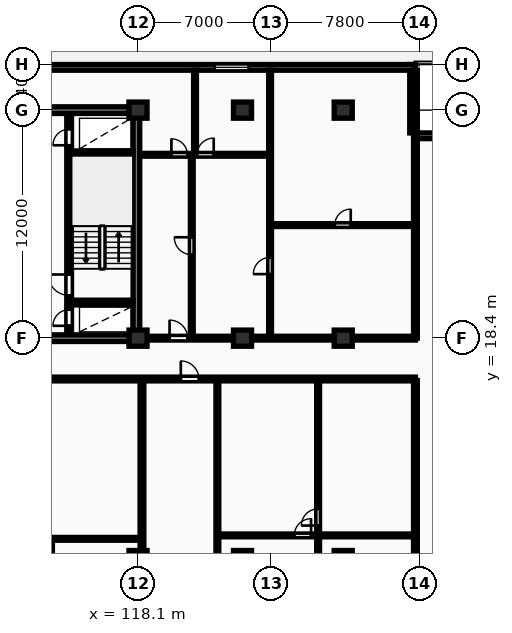
"""IFC4 building model, lengths in metres.
Left out: names, types, materials, properties, quantities, classifications, styles, units other than length and angle.
Written with IfcOpenShell. Run it as: python <this file> out.ifc"""

import sys

from ifc_helpers import new_model, si_unit, direction, frame, frame_2d, origin, origin_2d, place, context, subcontext, project, spatial, rectangle, extrude, element, fill, save


model = new_model("IFC4")
c1 = context("Model", 3, precision=1e-05, world=origin(), true_north=direction((0.0, 1.0)))
c2 = subcontext(c1, "Body", "Model", "MODEL_VIEW")
j1 = project(units=[si_unit("LENGTHUNIT", "METRE"), si_unit("PLANEANGLEUNIT", "RADIAN")], contexts=[c1])
p1 = place(None, origin())
s1 = spatial("IfcSite", under=j1, at=p1, CompositionType="ELEMENT")
p2 = place(p1, origin())
s2 = spatial("IfcBuilding", under=s1, at=p2, CompositionType="ELEMENT")
p3 = place(p2, frame((0.0, 0.0, 24.0)))
s3 = spatial("IfcBuildingStorey", under=s2, at=p3, CompositionType="ELEMENT", Elevation=24.0)
for number, where, z_axis, x_axis in (
    (1, (118.1, 6.8, 0.0), (0.0, 0.0, 1.0), (1.0, 0.0, 0.0)),
    (2, (118.1, 18.4, 0.0), (0.0, 0.0, 1.0), (1.0, 0.0, 0.0)),
    (3, (118.1, 30.4, 0.0), (0.0, 0.0, 1.0), (1.0, 0.0, 0.0)),
    (4, (123.6, 6.8, 0.0), (0.0, 0.0, 1.0), (1.0, 0.0, 0.0)),
    (5, (123.6, 18.4, 0.0), (0.0, 0.0, 1.0), (1.0, 0.0, 0.0)),
    (6, (123.6, 30.4, 0.0), (0.0, 0.0, 1.0), (1.0, 0.0, 0.0)),
    (7, (128.9, 6.8, 0.0), (0.0, 0.0, 1.0), (1.0, 0.0, 0.0)),
    (8, (128.9, 18.4, 0.0), (0.0, 0.0, 1.0), (1.0, 0.0, 0.0)),
    (9, (128.9, 30.4, 0.0), (0.0, 0.0, 1.0), (1.0, 0.0, 0.0)),
):
    element("IfcColumn", number, at=place(p3, frame(where, z_axis=z_axis, x_axis=x_axis)), inside=s3, PredefinedType="COLUMN", context=c2, shape_type="SweptSolid", body=[
        extrude(rectangle(XDim=0.95, YDim=0.85, at=origin_2d()), origin(), (0.0, 0.0, 1.0), 3.25),
    ])
for number, where, z_axis, x_axis in (
    (10, (136.3, 29.05, 0.0), (0.0, 0.0, 1.0), (-1.0, 0.0, 0.0)),
    (11, (132.55, 29.2, 0.0), (0.0, 0.0, 1.0), (0.0, 1.0, 0.0)),
):
    element("IfcWall", number, at=place(p3, frame(where, z_axis=z_axis, x_axis=x_axis)), inside=s3, PredefinedType="STANDARD", context=c2, shape_type="SweptSolid", body=[
        extrude(rectangle(XDim=3.6, YDim=0.3, at=frame_2d((1.8, 0.0))), origin(), (0.0, 0.0, 1.0), 2.97),
    ])
p4 = place(p3, frame((132.7, 32.65, 0.0), z_axis=(0.0, 0.0, 1.0), x_axis=(-1.0, 0.0, 0.0)))
e12 = element("IfcWall", 12, at=p4, inside=s3, PredefinedType="STANDARD", context=c2, shape_type="SweptSolid", body=[
    extrude(rectangle(XDim=62.0, YDim=0.3, at=frame_2d((31.0, 0.0))), origin(), (0.0, 0.0, 1.0), 2.97),
])
p5 = place(p4, frame((52.125, 0.0, 0.85)))
e13 = element("IfcOpeningElement", 13, at=p5, cuts=e12, PredefinedType="OPENING", context=c2, shape_type="SweptSolid", body=[
    extrude(rectangle(XDim=1.8, YDim=1.8, at=frame_2d((0.9, 0.9))), frame((0.0, 0.16, 0.0), z_axis=(0.0, -1.0, 0.0), x_axis=(1.0, 0.0, 0.0)), (0.0, 0.0, 1.0), 0.32),
])
p6 = place(p4, frame((8.775, 0.0, 0.85)))
e14 = element("IfcOpeningElement", 14, at=p6, cuts=e12, PredefinedType="OPENING", context=c2, shape_type="SweptSolid", body=[
    extrude(rectangle(XDim=1.8, YDim=1.8, at=frame_2d((0.9, 0.9))), frame((0.0, 0.16, 0.0), z_axis=(0.0, -1.0, 0.0), x_axis=(1.0, 0.0, 0.0)), (0.0, 0.0, 1.0), 0.32),
])
p7 = place(p3, frame((81.925, 30.4, 0.0), z_axis=(0.0, 0.0, 1.0), x_axis=(1.0, 0.0, 0.0)))
e15 = element("IfcWall", 15, at=p7, inside=s3, PredefinedType="SHEAR", context=c2, shape_type="SweptSolid", body=[
    extrude(rectangle(XDim=36.265, YDim=0.35, at=frame_2d((18.132, 0.0))), origin(), (0.0, 0.0, 1.0), 3.25),
])
p8 = place(p3, frame((118.015, 18.575, 0.0), z_axis=(0.0, 0.0, 1.0), x_axis=(0.0, 1.0, 0.0)))
e16 = element("IfcWall", 16, at=p8, inside=s3, PredefinedType="SHEAR", context=c2, shape_type="SweptSolid", body=[
    extrude(rectangle(XDim=11.65, YDim=0.35, at=frame_2d((5.825, 0.0))), origin(), (0.0, 0.0, 1.0), 3.25),
])
p9 = place(p3, frame((81.925, 18.4, 0.0), z_axis=(0.0, 0.0, 1.0), x_axis=(1.0, 0.0, 0.0)))
e17 = element("IfcWall", 17, at=p9, inside=s3, PredefinedType="SHEAR", context=c2, shape_type="SweptSolid", body=[
    extrude(rectangle(XDim=36.265, YDim=0.35, at=frame_2d((18.132, 0.0))), origin(), (0.0, 0.0, 1.0), 3.25),
])
p10 = place(p9, frame((5.675, 0.0, 0.0)))
e18 = element("IfcOpeningElement", 18, at=p10, cuts=e17, PredefinedType="OPENING", context=c2, shape_type="SweptSolid", body=[
    extrude(rectangle(XDim=1.0, YDim=2.15, at=frame_2d((0.5, 1.075))), frame((0.0, 0.185, 0.0), z_axis=(0.0, -1.0, 0.0), x_axis=(1.0, 0.0, 0.0)), (0.0, 0.0, 1.0), 0.37),
])
p11 = place(p9, frame((21.925, 0.0, 0.0)))
e19 = element("IfcOpeningElement", 19, at=p11, cuts=e17, PredefinedType="OPENING", context=c2, shape_type="SweptSolid", body=[
    extrude(rectangle(XDim=1.5, YDim=2.2, at=frame_2d((0.75, 1.1))), frame((0.0, 0.185, 0.0), z_axis=(0.0, -1.0, 0.0), x_axis=(1.0, 0.0, 0.0)), (0.0, 0.0, 1.0), 0.37),
])
p12 = place(p9, frame((29.875, 0.0, 0.0)))
e20 = element("IfcOpeningElement", 20, at=p12, cuts=e17, PredefinedType="OPENING", context=c2, shape_type="SweptSolid", body=[
    extrude(rectangle(XDim=1.0, YDim=2.15, at=frame_2d((0.5, 1.075))), frame((0.0, 0.185, 0.0), z_axis=(0.0, -1.0, 0.0), x_axis=(1.0, 0.0, 0.0)), (0.0, 0.0, 1.0), 0.37),
])
p13 = place(p3, frame((114.475, 18.6, 0.0), z_axis=(0.0, 0.0, 1.0), x_axis=(0.0, 1.0, 0.0)))
e21 = element("IfcWall", 21, at=p13, inside=s3, PredefinedType="SHEAR", context=c2, shape_type="SweptSolid", body=[
    extrude(rectangle(XDim=11.6, YDim=0.25, at=frame_2d((5.8, 0.0))), origin(), (0.0, 0.0, 1.0), 3.25),
])
p14 = place(p13, frame((0.45, 0.0, 0.0)))
e22 = element("IfcOpeningElement", 22, at=p14, cuts=e21, PredefinedType="OPENING", context=c2, shape_type="SweptSolid", body=[
    extrude(rectangle(XDim=0.85, YDim=2.05, at=frame_2d((0.425, 1.025))), frame((0.0, 0.135, 0.0), z_axis=(0.0, -1.0, 0.0), x_axis=(1.0, 0.0, 0.0)), (0.0, 0.0, 1.0), 0.27),
])
p15 = place(p13, frame((2.05, 0.0, 0.0)))
e23 = element("IfcOpeningElement", 23, at=p15, cuts=e21, PredefinedType="OPENING", context=c2, shape_type="SweptSolid", body=[
    extrude(rectangle(XDim=1.1, YDim=2.1, at=frame_2d((0.55, 1.05))), frame((0.0, 0.135, 0.0), z_axis=(0.0, -1.0, 0.0), x_axis=(1.0, 0.0, 0.0)), (0.0, 0.0, 1.0), 0.27),
])
p16 = place(p13, frame((9.95, 0.0, 0.0)))
e24 = element("IfcOpeningElement", 24, at=p16, cuts=e21, PredefinedType="OPENING", context=c2, shape_type="SweptSolid", body=[
    extrude(rectangle(XDim=0.85, YDim=2.05, at=frame_2d((0.425, 1.025))), frame((0.0, 0.135, 0.0), z_axis=(0.0, -1.0, 0.0), x_axis=(1.0, 0.0, 0.0)), (0.0, 0.0, 1.0), 0.27),
])
for number, where, z_axis, x_axis in (
    (25, (114.6, 20.275, 0.0), (0.0, 0.0, 1.0), (1.0, 0.0, 0.0)),
    (26, (114.6, 28.125, 0.0), (0.0, 0.0, 1.0), (1.0, 0.0, 0.0)),
):
    element("IfcWall", number, at=place(p3, frame(where, z_axis=z_axis, x_axis=x_axis)), inside=s3, PredefinedType="SHEAR", context=c2, shape_type="SweptSolid", body=[
        extrude(rectangle(XDim=3.24, YDim=0.25, at=frame_2d((1.62, 0.0))), origin(), (0.0, 0.0, 1.0), 3.25),
    ])
p17 = place(p3, frame((132.7, 18.4, 0.0), z_axis=(0.0, 0.0, 1.0), x_axis=(0.0, 1.0, 0.0)))
e27 = element("IfcWall", 27, at=p17, inside=s3, PredefinedType="PARTITIONING", context=c2, shape_type="SweptSolid", body=[
    extrude(rectangle(XDim=14.1, YDim=0.2, at=frame_2d((7.05, 0.0))), origin(), (0.0, 0.0, 1.0), 2.97),
])
p18 = place(p3, frame((125.05, 24.35, 0.0), z_axis=(0.0, 0.0, 1.0), x_axis=(1.0, 0.0, 0.0)))
e28 = element("IfcWall", 28, at=p18, inside=s3, PredefinedType="PARTITIONING", context=c2, shape_type="SweptSolid", body=[
    extrude(rectangle(XDim=7.65, YDim=0.15, at=frame_2d((3.825, 0.0))), origin(), (0.0, 0.0, 1.0), 2.97),
])
p19 = place(p18, frame((3.405, 0.0, 0.0)))
e29 = element("IfcOpeningElement", 29, at=p19, cuts=e28, PredefinedType="OPENING", context=c2, shape_type="SweptSolid", body=[
    extrude(rectangle(XDim=0.84, YDim=2.04, at=frame_2d((0.42, 1.02))), frame((0.0, 0.085, 0.0), z_axis=(0.0, -1.0, 0.0), x_axis=(1.0, 0.0, 0.0)), (0.0, 0.0, 1.0), 0.17),
])
p20 = place(p3, frame((125.05, 18.45, 0.0), z_axis=(0.0, 0.0, 1.0), x_axis=(0.0, 1.0, 0.0)))
e30 = element("IfcWall", 30, at=p20, inside=s3, PredefinedType="PARTITIONING", context=c2, shape_type="SweptSolid", body=[
    extrude(rectangle(XDim=14.05, YDim=0.15, at=frame_2d((7.025, 0.0))), origin(), (0.0, 0.0, 1.0), 2.97),
])
p21 = place(p20, frame((3.32, 0.0, 0.0)))
e31 = element("IfcOpeningElement", 31, at=p21, cuts=e30, PredefinedType="OPENING", context=c2, shape_type="SweptSolid", body=[
    extrude(rectangle(XDim=0.88, YDim=2.06, at=frame_2d((0.44, 1.03))), frame((0.0, 0.085, 0.0), z_axis=(0.0, -1.0, 0.0), x_axis=(1.0, 0.0, 0.0)), (0.0, 0.0, 1.0), 0.17),
])
p22 = place(p3, frame((120.93, 18.45, 0.0), z_axis=(0.0, 0.0, 1.0), x_axis=(0.0, 1.0, 0.0)))
e32 = element("IfcWall", 32, at=p22, inside=s3, PredefinedType="PARTITIONING", context=c2, shape_type="SweptSolid", body=[
    extrude(rectangle(XDim=9.6, YDim=0.15, at=frame_2d((4.8, 0.0))), origin(), (0.0, 0.0, 1.0), 2.97),
])
p23 = place(p22, frame((4.34, 0.0, 0.0)))
e33 = element("IfcOpeningElement", 33, at=p23, cuts=e32, PredefinedType="OPENING", context=c2, shape_type="SweptSolid", body=[
    extrude(rectangle(XDim=0.92, YDim=2.08, at=frame_2d((0.46, 1.04))), frame((0.0, 0.085, 0.0), z_axis=(0.0, -1.0, 0.0), x_axis=(1.0, 0.0, 0.0)), (0.0, 0.0, 1.0), 0.17),
])
p24 = place(p3, frame((121.1, 28.05, 0.0), z_axis=(0.0, 0.0, 1.0), x_axis=(0.0, 1.0, 0.0)))
e34 = element("IfcWall", 34, at=p24, inside=s3, PredefinedType="PARTITIONING", context=c2, shape_type="SweptSolid", body=[
    extrude(rectangle(XDim=4.45, YDim=0.15, at=frame_2d((2.225, 0.0))), origin(), (0.0, 0.0, 1.0), 2.97),
])
p25 = place(p3, frame((118.27, 28.05, 0.0), z_axis=(0.0, 0.0, 1.0), x_axis=(1.0, 0.0, 0.0)))
e35 = element("IfcWall", 35, at=p25, inside=s3, PredefinedType="PARTITIONING", context=c2, shape_type="SweptSolid", body=[
    extrude(rectangle(XDim=6.76, YDim=0.15, at=frame_2d((3.38, 0.0))), origin(), (0.0, 0.0, 1.0), 2.97),
])
p26 = place(p25, frame((1.587, 0.0, 0.0)))
e36 = element("IfcOpeningElement", 36, at=p26, cuts=e35, PredefinedType="OPENING", context=c2, shape_type="SweptSolid", body=[
    extrude(rectangle(XDim=0.84, YDim=2.04, at=frame_2d((0.42, 1.02))), frame((0.0, 0.085, 0.0), z_axis=(0.0, -1.0, 0.0), x_axis=(1.0, 0.0, 0.0)), (0.0, 0.0, 1.0), 0.17),
])
p27 = place(p25, frame((2.934, 0.0, 0.0)))
e37 = element("IfcOpeningElement", 37, at=p27, cuts=e35, PredefinedType="OPENING", context=c2, shape_type="SweptSolid", body=[
    extrude(rectangle(XDim=0.88, YDim=2.06, at=frame_2d((0.44, 1.03))), frame((0.0, 0.085, 0.0), z_axis=(0.0, -1.0, 0.0), x_axis=(1.0, 0.0, 0.0)), (0.0, 0.0, 1.0), 0.17),
])
p28 = place(p3, frame((118.25, 18.4, 0.0), z_axis=(0.0, 0.0, 1.0), x_axis=(1.0, 0.0, 0.0)))
e38 = element("IfcWall", 38, at=p28, inside=s3, PredefinedType="PARTITIONING", context=c2, shape_type="SweptSolid", body=[
    extrude(rectangle(XDim=14.45, YDim=0.2, at=frame_2d((7.225, 0.0))), origin(), (0.0, 0.0, 1.0), 2.37),
])
p29 = place(p28, frame((1.51, 0.0, 0.0)))
e39 = element("IfcOpeningElement", 39, at=p29, cuts=e38, PredefinedType="OPENING", context=c2, shape_type="SweptSolid", body=[
    extrude(rectangle(XDim=0.95, YDim=2.15, at=frame_2d((0.475, 1.075))), frame((0.0, 0.11, 0.0), z_axis=(0.0, -1.0, 0.0), x_axis=(1.0, 0.0, 0.0)), (0.0, 0.0, 1.0), 0.22),
])
p30 = place(p3, frame((132.7, -10.9, 0.0), z_axis=(0.0, 0.0, 1.0), x_axis=(0.0, 1.0, 0.0)))
e40 = element("IfcWall", 40, at=p30, inside=s3, PredefinedType="PARTITIONING", context=c2, shape_type="SweptSolid", body=[
    extrude(rectangle(XDim=27.07, YDim=0.2, at=frame_2d((13.535, 0.0))), origin(), (0.0, 0.0, 1.0), 2.97),
])
p31 = place(p3, frame((118.307, -10.9, 0.0), z_axis=(0.0, 0.0, 1.0), x_axis=(0.0, 1.0, 0.0)))
e41 = element("IfcWall", 41, at=p31, inside=s3, PredefinedType="PARTITIONING", context=c2, shape_type="SweptSolid", body=[
    extrude(rectangle(XDim=27.07, YDim=0.2, at=frame_2d((13.535, 0.0))), origin(), (0.0, 0.0, 1.0), 2.22),
])
p32 = place(p3, frame((109.052, 7.84, 0.0), z_axis=(0.0, 0.0, 1.0), x_axis=(1.0, 0.0, 0.0)))
e42 = element("IfcWall", 42, at=p32, inside=s3, PredefinedType="PARTITIONING", context=c2, shape_type="SweptSolid", body=[
    extrude(rectangle(XDim=9.176, YDim=0.15, at=frame_2d((4.588, 0.0))), origin(), (0.0, 0.0, 1.0), 2.97),
])
p33 = place(p32, frame((3.307, 0.0, 0.0)))
e43 = element("IfcOpeningElement", 43, at=p33, cuts=e42, PredefinedType="OPENING", context=c2, shape_type="SweptSolid", body=[
    extrude(rectangle(XDim=0.88, YDim=2.06, at=frame_2d((0.44, 1.03))), frame((0.0, 0.085, 0.0), z_axis=(0.0, -1.0, 0.0), x_axis=(1.0, 0.0, 0.0)), (0.0, 0.0, 1.0), 0.17),
])
p34 = place(p3, frame((127.579, -0.51, 0.0), z_axis=(0.0, 0.0, 1.0), x_axis=(0.0, 1.0, 0.0)))
e44 = element("IfcWall", 44, at=p34, inside=s3, PredefinedType="PARTITIONING", context=c2, shape_type="SweptSolid", body=[
    extrude(rectangle(XDim=16.7, YDim=0.15, at=frame_2d((8.35, 0.0))), origin(), (0.0, 0.0, 1.0), 2.97),
])
p35 = place(p34, frame((4.746, 0.0, 0.0)))
e45 = element("IfcOpeningElement", 45, at=p35, cuts=e44, PredefinedType="OPENING", context=c2, shape_type="SweptSolid", body=[
    extrude(rectangle(XDim=0.84, YDim=2.04, at=frame_2d((0.42, 1.02))), frame((0.0, 0.085, 0.0), z_axis=(0.0, -1.0, 0.0), x_axis=(1.0, 0.0, 0.0)), (0.0, 0.0, 1.0), 0.17),
])
p36 = place(p34, frame((9.048, 0.0, 0.0)))
e46 = element("IfcOpeningElement", 46, at=p36, cuts=e44, PredefinedType="OPENING", context=c2, shape_type="SweptSolid", body=[
    extrude(rectangle(XDim=0.88, YDim=2.06, at=frame_2d((0.44, 1.03))), frame((0.0, 0.085, 0.0), z_axis=(0.0, -1.0, 0.0), x_axis=(1.0, 0.0, 0.0)), (0.0, 0.0, 1.0), 0.17),
])
p37 = place(p3, frame((122.337, 8.02, 0.0), z_axis=(0.0, 0.0, 1.0), x_axis=(1.0, 0.0, 0.0)))
e47 = element("IfcWall", 47, at=p37, inside=s3, PredefinedType="PARTITIONING", context=c2, shape_type="SweptSolid", body=[
    extrude(rectangle(XDim=10.283, YDim=0.15, at=frame_2d((5.142, 0.0))), origin(), (0.0, 0.0, 1.0), 2.97),
])
p38 = place(p37, frame((3.99, 0.0, 0.0)))
e48 = element("IfcOpeningElement", 48, at=p38, cuts=e47, PredefinedType="OPENING", context=c2, shape_type="SweptSolid", body=[
    extrude(rectangle(XDim=0.88, YDim=2.06, at=frame_2d((0.44, 1.03))), frame((0.0, 0.085, 0.0), z_axis=(0.0, -1.0, 0.0), x_axis=(1.0, 0.0, 0.0)), (0.0, 0.0, 1.0), 0.17),
])
p39 = place(p3, frame((122.277, -0.51, 0.0), z_axis=(0.0, 0.0, 1.0), x_axis=(0.0, 1.0, 0.0)))
e49 = element("IfcWall", 49, at=p39, inside=s3, PredefinedType="PARTITIONING", context=c2, shape_type="SweptSolid", body=[
    extrude(rectangle(XDim=16.7, YDim=0.15, at=frame_2d((8.35, 0.0))), origin(), (0.0, 0.0, 1.0), 2.97),
])
p40 = place(p39, frame((4.721, 0.0, 0.0)))
e50 = element("IfcOpeningElement", 50, at=p40, cuts=e49, PredefinedType="OPENING", context=c2, shape_type="SweptSolid", body=[
    extrude(rectangle(XDim=0.88, YDim=2.06, at=frame_2d((0.44, 1.03))), frame((0.0, 0.085, 0.0), z_axis=(0.0, -1.0, 0.0), x_axis=(1.0, 0.0, 0.0)), (0.0, 0.0, 1.0), 0.17),
])
p41 = place(p3, frame((70.7, 16.25, 0.0), z_axis=(0.0, 0.0, 1.0), x_axis=(1.0, 0.0, 0.0)))
e51 = element("IfcWall", 51, at=p41, inside=s3, PredefinedType="PARTITIONING", context=c2, shape_type="SweptSolid", body=[
    extrude(rectangle(XDim=62.0, YDim=0.2, at=frame_2d((31.0, 0.0))), origin(), (0.0, 0.0, 1.0), 2.97),
])
p42 = place(p41, frame((1.186, 0.0, 0.0)))
e52 = element("IfcOpeningElement", 52, at=p42, cuts=e51, PredefinedType="OPENING", context=c2, shape_type="SweptSolid", body=[
    extrude(rectangle(XDim=0.95, YDim=2.15, at=frame_2d((0.475, 1.075))), frame((0.0, 0.11, 0.0), z_axis=(0.0, -1.0, 0.0), x_axis=(1.0, 0.0, 0.0)), (0.0, 0.0, 1.0), 0.22),
])
p43 = place(p41, frame((13.116, 0.0, 0.0)))
e53 = element("IfcOpeningElement", 53, at=p43, cuts=e51, PredefinedType="OPENING", context=c2, shape_type="SweptSolid", body=[
    extrude(rectangle(XDim=0.95, YDim=2.15, at=frame_2d((0.475, 1.075))), frame((0.0, 0.11, 0.0), z_axis=(0.0, -1.0, 0.0), x_axis=(1.0, 0.0, 0.0)), (0.0, 0.0, 1.0), 0.22),
])
p44 = place(p41, frame((25.295, 0.0, 0.0)))
e54 = element("IfcOpeningElement", 54, at=p44, cuts=e51, PredefinedType="OPENING", context=c2, shape_type="SweptSolid", body=[
    extrude(rectangle(XDim=0.95, YDim=2.15, at=frame_2d((0.475, 1.075))), frame((0.0, 0.11, 0.0), z_axis=(0.0, -1.0, 0.0), x_axis=(1.0, 0.0, 0.0)), (0.0, 0.0, 1.0), 0.22),
])
p45 = place(p41, frame((35.747, 0.0, 0.0)))
e55 = element("IfcOpeningElement", 55, at=p45, cuts=e51, PredefinedType="OPENING", context=c2, shape_type="SweptSolid", body=[
    extrude(rectangle(XDim=0.95, YDim=2.15, at=frame_2d((0.475, 1.075))), frame((0.0, 0.11, 0.0), z_axis=(0.0, -1.0, 0.0), x_axis=(1.0, 0.0, 0.0)), (0.0, 0.0, 1.0), 0.22),
])
p46 = place(p41, frame((49.652, 0.0, 0.0)))
e56 = element("IfcOpeningElement", 56, at=p46, cuts=e51, PredefinedType="OPENING", context=c2, shape_type="SweptSolid", body=[
    extrude(rectangle(XDim=0.95, YDim=2.15, at=frame_2d((0.475, 1.075))), frame((0.0, 0.11, 0.0), z_axis=(0.0, -1.0, 0.0), x_axis=(1.0, 0.0, 0.0)), (0.0, 0.0, 1.0), 0.22),
])
p47 = place(p6, origin())
e57 = element("IfcWindow", 57, at=p47, inside=s3, PartitioningType="SINGLE_PANEL", PredefinedType="WINDOW", context=c2, shape_type="SweptSolid", body=[
    extrude(rectangle(XDim=1.8, YDim=1.8, at=frame_2d((0.9, 0.9))), frame((0.0, 0.03, 0.0), z_axis=(0.0, -1.0, 0.0), x_axis=(1.0, 0.0, 0.0)), (0.0, 0.0, 1.0), 0.06),
])
fill(e14, e57)
p48 = place(p14, origin())
e58 = element("IfcDoor", 58, at=p48, inside=s3, OperationType="SINGLE_SWING_LEFT", PredefinedType="DOOR", context=c2, shape_type="SweptSolid", body=[
    extrude(rectangle(XDim=0.85, YDim=2.05, at=frame_2d((0.425, 1.025))), frame((0.0, 0.025, 0.0), z_axis=(0.0, -1.0, 0.0), x_axis=(1.0, 0.0, 0.0)), (0.0, 0.0, 1.0), 0.05),
])
fill(e22, e58)
p49 = place(p15, origin())
e59 = element("IfcDoor", 59, at=p49, inside=s3, OperationType="SINGLE_SWING_RIGHT", PredefinedType="DOOR", context=c2, shape_type="SweptSolid", body=[
    extrude(rectangle(XDim=1.1, YDim=2.1, at=frame_2d((0.55, 1.05))), frame((0.0, 0.025, 0.0), z_axis=(0.0, -1.0, 0.0), x_axis=(1.0, 0.0, 0.0)), (0.0, 0.0, 1.0), 0.05),
])
fill(e23, e59)
p50 = place(p16, origin())
e60 = element("IfcDoor", 60, at=p50, inside=s3, OperationType="SINGLE_SWING_LEFT", PredefinedType="DOOR", context=c2, shape_type="SweptSolid", body=[
    extrude(rectangle(XDim=0.85, YDim=2.05, at=frame_2d((0.425, 1.025))), frame((0.0, 0.025, 0.0), z_axis=(0.0, -1.0, 0.0), x_axis=(1.0, 0.0, 0.0)), (0.0, 0.0, 1.0), 0.05),
])
fill(e24, e60)
p51 = place(p19, origin())
e61 = element("IfcDoor", 61, at=p51, inside=s3, OperationType="SINGLE_SWING_RIGHT", PredefinedType="DOOR", context=c2, shape_type="SweptSolid", body=[
    extrude(rectangle(XDim=0.84, YDim=2.04, at=frame_2d((0.42, 1.02))), frame((0.0, 0.025, 0.0), z_axis=(0.0, -1.0, 0.0), x_axis=(1.0, 0.0, 0.0)), (0.0, 0.0, 1.0), 0.05),
])
fill(e29, e61)
p52 = place(p21, origin())
e62 = element("IfcDoor", 62, at=p52, inside=s3, OperationType="SINGLE_SWING_LEFT", PredefinedType="DOOR", context=c2, shape_type="SweptSolid", body=[
    extrude(rectangle(XDim=0.88, YDim=2.06, at=frame_2d((0.44, 1.03))), frame((0.0, 0.025, 0.0), z_axis=(0.0, -1.0, 0.0), x_axis=(1.0, 0.0, 0.0)), (0.0, 0.0, 1.0), 0.05),
])
fill(e31, e62)
p53 = place(p23, origin())
e63 = element("IfcDoor", 63, at=p53, inside=s3, OperationType="SINGLE_SWING_RIGHT", PredefinedType="DOOR", context=c2, shape_type="SweptSolid", body=[
    extrude(rectangle(XDim=0.92, YDim=2.08, at=frame_2d((0.46, 1.04))), frame((0.0, 0.025, 0.0), z_axis=(0.0, -1.0, 0.0), x_axis=(1.0, 0.0, 0.0)), (0.0, 0.0, 1.0), 0.05),
])
fill(e33, e63)
p54 = place(p26, origin())
e64 = element("IfcDoor", 64, at=p54, inside=s3, OperationType="SINGLE_SWING_LEFT", PredefinedType="DOOR", context=c2, shape_type="SweptSolid", body=[
    extrude(rectangle(XDim=0.84, YDim=2.04, at=frame_2d((0.42, 1.02))), frame((0.0, 0.025, 0.0), z_axis=(0.0, -1.0, 0.0), x_axis=(1.0, 0.0, 0.0)), (0.0, 0.0, 1.0), 0.05),
])
fill(e36, e64)
p55 = place(p27, origin())
e65 = element("IfcDoor", 65, at=p55, inside=s3, OperationType="SINGLE_SWING_RIGHT", PredefinedType="DOOR", context=c2, shape_type="SweptSolid", body=[
    extrude(rectangle(XDim=0.88, YDim=2.06, at=frame_2d((0.44, 1.03))), frame((0.0, 0.025, 0.0), z_axis=(0.0, -1.0, 0.0), x_axis=(1.0, 0.0, 0.0)), (0.0, 0.0, 1.0), 0.05),
])
fill(e37, e65)
p56 = place(p29, origin())
e66 = element("IfcDoor", 66, at=p56, inside=s3, OperationType="SINGLE_SWING_LEFT", PredefinedType="DOOR", context=c2, shape_type="SweptSolid", body=[
    extrude(rectangle(XDim=0.95, YDim=2.15, at=frame_2d((0.475, 1.075))), frame((0.0, 0.025, 0.0), z_axis=(0.0, -1.0, 0.0), x_axis=(1.0, 0.0, 0.0)), (0.0, 0.0, 1.0), 0.05),
])
fill(e39, e66)
p57 = place(p36, origin())
e67 = element("IfcDoor", 67, at=p57, inside=s3, OperationType="SINGLE_SWING_LEFT", PredefinedType="DOOR", context=c2, shape_type="SweptSolid", body=[
    extrude(rectangle(XDim=0.88, YDim=2.06, at=frame_2d((0.44, 1.03))), frame((0.0, 0.025, 0.0), z_axis=(0.0, -1.0, 0.0), x_axis=(1.0, 0.0, 0.0)), (0.0, 0.0, 1.0), 0.05),
])
fill(e46, e67)
p58 = place(p38, origin())
e68 = element("IfcDoor", 68, at=p58, inside=s3, OperationType="SINGLE_SWING_RIGHT", PredefinedType="DOOR", context=c2, shape_type="SweptSolid", body=[
    extrude(rectangle(XDim=0.88, YDim=2.06, at=frame_2d((0.44, 1.03))), frame((0.0, 0.025, 0.0), z_axis=(0.0, -1.0, 0.0), x_axis=(1.0, 0.0, 0.0)), (0.0, 0.0, 1.0), 0.05),
])
fill(e48, e68)
p59 = place(p46, origin())
e69 = element("IfcDoor", 69, at=p59, inside=s3, OperationType="SINGLE_SWING_LEFT", PredefinedType="DOOR", context=c2, shape_type="SweptSolid", body=[
    extrude(rectangle(XDim=0.95, YDim=2.15, at=frame_2d((0.475, 1.075))), frame((0.0, 0.025, 0.0), z_axis=(0.0, -1.0, 0.0), x_axis=(1.0, 0.0, 0.0)), (0.0, 0.0, 1.0), 0.05),
])
fill(e56, e69)
save(model, sys.argv[1])
